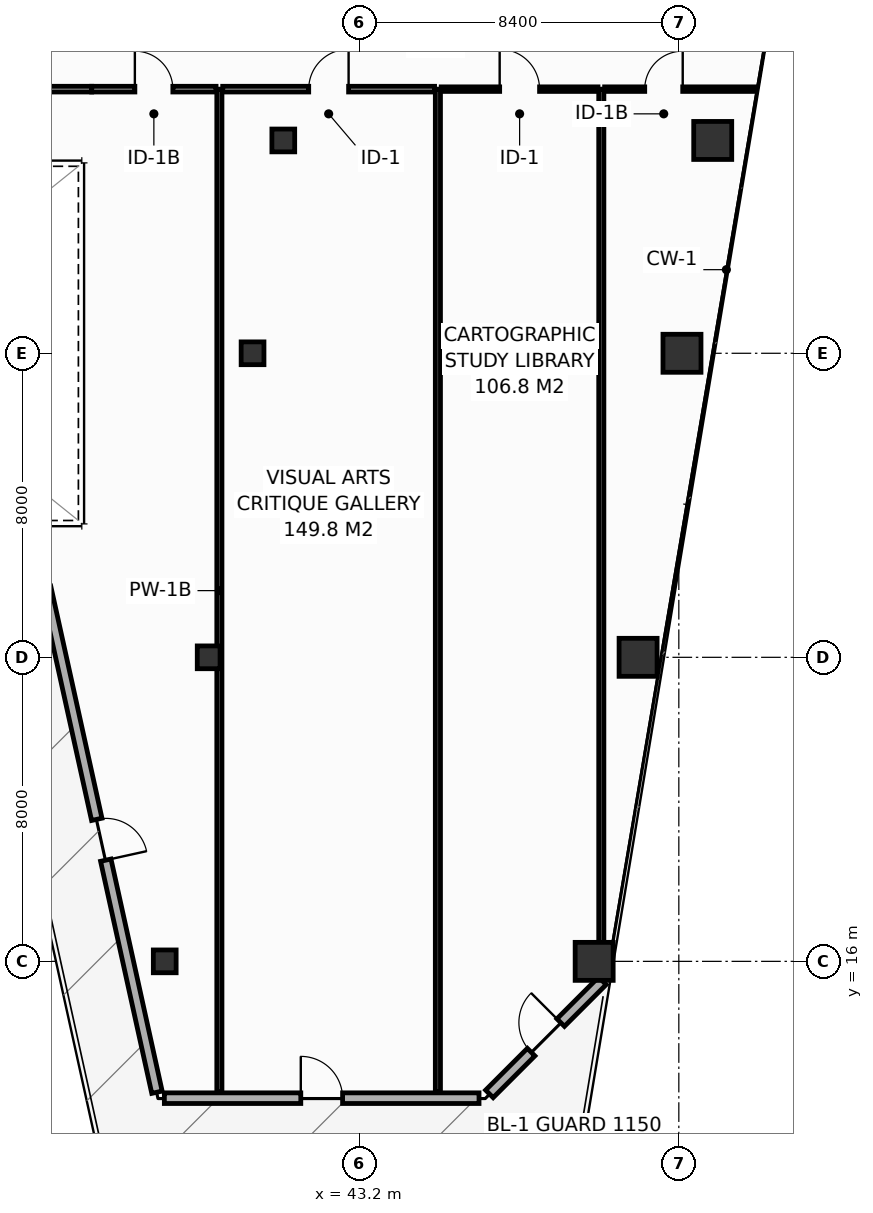
"""IFC4 building model, lengths in metres.
Left out: names, types, materials, properties, quantities, classifications, styles, units other than length and angle.
Written with IfcOpenShell. Run it as: python <this file> out.ifc"""

import sys

from ifc_helpers import new_model, si_unit, direction, frame, frame_2d, origin, origin_2d, place, context, subcontext, project, spatial, rectangle, hollow_rectangle, extrude, element, fill, save


model = new_model("IFC4")
c1 = context("Model", 3, precision=1e-05, world=origin(), true_north=direction((0.0, 1.0)))
c2 = subcontext(c1, "Body", "Model", "MODEL_VIEW")
j1 = project(units=[si_unit("LENGTHUNIT", "METRE"), si_unit("PLANEANGLEUNIT", "RADIAN")], contexts=[c1])
p1 = place(None, origin())
s1 = spatial("IfcSite", under=j1, at=p1, CompositionType="ELEMENT")
p2 = place(p1, origin())
s2 = spatial("IfcBuilding", under=s1, at=p2, CompositionType="ELEMENT")
p3 = place(p2, frame((0.0, 0.0, 167.6)))
s3 = spatial("IfcBuildingStorey", under=s2, at=p3, CompositionType="ELEMENT", Elevation=167.6)
p4 = place(p3, frame((49.372, 16.0, 0.0), z_axis=(0.0, 0.0, 1.0), x_axis=(1.0, 0.0, 0.0)))
e1 = element("IfcColumn", 1, at=p4, inside=s3, PredefinedType="COLUMN", context=c2, shape_type="SweptSolid", body=[
    extrude(hollow_rectangle(XDim=1.0, YDim=1.0, WallThickness=0.045, at=origin_2d()), origin(), (0.0, 0.0, 1.0), 3.8),
])
p5 = place(p3, frame((38.072, 16.0, 0.0), z_axis=(0.0, 0.0, 1.0), x_axis=(1.0, 0.0, 0.0)))
e2 = element("IfcColumn", 2, at=p5, inside=s3, PredefinedType="COLUMN", context=c2, shape_type="SweptSolid", body=[
    extrude(hollow_rectangle(XDim=0.6, YDim=0.6, WallThickness=0.028, at=origin_2d()), origin(), (0.0, 0.0, 1.0), 3.8),
])
p6 = place(p3, frame((50.528, 24.0, 0.0), z_axis=(0.0, 0.0, 1.0), x_axis=(1.0, 0.0, 0.0)))
e3 = element("IfcColumn", 3, at=p6, inside=s3, PredefinedType="COLUMN", context=c2, shape_type="SweptSolid", body=[
    extrude(hollow_rectangle(XDim=1.0, YDim=1.0, WallThickness=0.045, at=origin_2d()), origin(), (0.0, 0.0, 1.0), 3.8),
])
p7 = place(p3, frame((39.228, 24.0, 0.0), z_axis=(0.0, 0.0, 1.0), x_axis=(1.0, 0.0, 0.0)))
e4 = element("IfcColumn", 4, at=p7, inside=s3, PredefinedType="COLUMN", context=c2, shape_type="SweptSolid", body=[
    extrude(hollow_rectangle(XDim=0.6, YDim=0.6, WallThickness=0.028, at=origin_2d()), origin(), (0.0, 0.0, 1.0), 3.8),
])
p8 = place(p3, frame((51.683, 32.0, 0.0), z_axis=(0.0, 0.0, 1.0), x_axis=(1.0, 0.0, 0.0)))
e5 = element("IfcColumn", 5, at=p8, inside=s3, PredefinedType="COLUMN", context=c2, shape_type="SweptSolid", body=[
    extrude(hollow_rectangle(XDim=1.0, YDim=1.0, WallThickness=0.045, at=origin_2d()), origin(), (0.0, 0.0, 1.0), 3.8),
])
p9 = place(p3, frame((40.383, 32.0, 0.0), z_axis=(0.0, 0.0, 1.0), x_axis=(1.0, 0.0, 0.0)))
e6 = element("IfcColumn", 6, at=p9, inside=s3, PredefinedType="COLUMN", context=c2, shape_type="SweptSolid", body=[
    extrude(hollow_rectangle(XDim=0.6, YDim=0.6, WallThickness=0.028, at=origin_2d()), origin(), (0.0, 0.0, 1.0), 3.8),
])
p10 = place(p3, frame((52.492, 37.6, 0.0), z_axis=(0.0, 0.0, 1.0), x_axis=(1.0, 0.0, 0.0)))
e7 = element("IfcColumn", 7, at=p10, inside=s3, PredefinedType="COLUMN", context=c2, shape_type="SweptSolid", body=[
    extrude(hollow_rectangle(XDim=1.0, YDim=1.0, WallThickness=0.045, at=origin_2d()), origin(), (0.0, 0.0, 1.0), 3.8),
])
p11 = place(p3, frame((41.192, 37.6, 0.0), z_axis=(0.0, 0.0, 1.0), x_axis=(1.0, 0.0, 0.0)))
e8 = element("IfcColumn", 8, at=p11, inside=s3, PredefinedType="COLUMN", context=c2, shape_type="SweptSolid", body=[
    extrude(hollow_rectangle(XDim=0.6, YDim=0.6, WallThickness=0.028, at=origin_2d()), origin(), (0.0, 0.0, 1.0), 3.8),
])
p12 = place(p3, frame((34.937, 25.844, 0.0), z_axis=(0.0, 0.0, 1.0), x_axis=(0.215397075206, -0.976526548535, 0.0)))
e9 = element("IfcWall", 9, at=p12, inside=s3, PredefinedType="STANDARD", context=c2, shape_type="SweptSolid", body=[
    extrude(rectangle(XDim=13.607, YDim=0.28, at=frame_2d((6.803, 0.0))), origin(), (0.0, 0.0, 1.0), 3.55),
])
p13 = place(p12, frame((6.254, 0.0, 0.0)))
e10 = element("IfcOpeningElement", 10, at=p13, cuts=e9, PredefinedType="OPENING", context=c2, shape_type="SweptSolid", body=[
    extrude(rectangle(XDim=1.1, YDim=2.2, at=frame_2d((0.55, 1.1))), frame((0.0, 0.15, 0.0), z_axis=(0.0, -1.0, 0.0), x_axis=(1.0, 0.0, 0.0)), (0.0, 0.0, 1.0), 0.3),
])
p14 = place(p3, frame((38.062, 12.4, 0.0), z_axis=(0.0, 0.0, 1.0), x_axis=(1.0, 0.0, 0.0)))
e11 = element("IfcWall", 11, at=p14, inside=s3, PredefinedType="STANDARD", context=c2, shape_type="SweptSolid", body=[
    extrude(rectangle(XDim=8.28, YDim=0.28, at=frame_2d((4.14, 0.0))), origin(), (0.0, 0.0, 1.0), 3.55),
])
p15 = place(p14, frame((3.59, 0.0, 0.0)))
e12 = element("IfcOpeningElement", 12, at=p15, cuts=e11, PredefinedType="OPENING", context=c2, shape_type="SweptSolid", body=[
    extrude(rectangle(XDim=1.1, YDim=2.2, at=frame_2d((0.55, 1.1))), frame((0.0, 0.15, 0.0), z_axis=(0.0, -1.0, 0.0), x_axis=(1.0, 0.0, 0.0)), (0.0, 0.0, 1.0), 0.3),
])
p16 = place(p3, frame((46.615, 12.513, 0.0), z_axis=(0.0, 0.0, 1.0), x_axis=(0.707135806771, 0.70707775441, 0.0)))
e13 = element("IfcWall", 13, at=p16, inside=s3, PredefinedType="STANDARD", context=c2, shape_type="SweptSolid", body=[
    extrude(rectangle(XDim=4.206, YDim=0.28, at=frame_2d((2.103, 0.0))), origin(), (0.0, 0.0, 1.0), 3.55),
])
p17 = place(p16, frame((1.553, 0.0, 0.0)))
e14 = element("IfcOpeningElement", 14, at=p17, cuts=e13, PredefinedType="OPENING", context=c2, shape_type="SweptSolid", body=[
    extrude(rectangle(XDim=1.1, YDim=2.2, at=frame_2d((0.55, 1.1))), frame((0.0, 0.15, 0.0), z_axis=(0.0, -1.0, 0.0), x_axis=(1.0, 0.0, 0.0)), (0.0, 0.0, 1.0), 0.3),
])
for number, where, z_axis, x_axis in (
    (15, (39.51, 12.56, 0.0), (0.0, 0.0, 1.0), (0.0, 1.0, 0.0)),
    (16, (45.26, 12.56, 0.0), (0.0, 0.0, 1.0), (0.0, 1.0, 0.0)),
):
    element("IfcWall", number, at=place(p3, frame(where, z_axis=z_axis, x_axis=x_axis)), inside=s3, PredefinedType="PARTITIONING", context=c2, shape_type="SweptSolid", body=[
        extrude(rectangle(XDim=26.39, YDim=0.135, at=frame_2d((13.195, 0.0))), origin(), (0.0, 0.0, 1.0), 2.835),
    ])
p18 = place(p3, frame((49.56, 15.516, 0.0), z_axis=(0.0, 0.0, 1.0), x_axis=(0.0, 1.0, 0.0)))
e17 = element("IfcWall", 17, at=p18, inside=s3, PredefinedType="PARTITIONING", context=c2, shape_type="SweptSolid", body=[
    extrude(rectangle(XDim=23.434, YDim=0.135, at=frame_2d((11.717, 0.0))), origin(), (0.0, 0.0, 1.0), 2.835),
])
p19 = place(p3, frame((23.85, 38.95, 0.0), z_axis=(0.0, 0.0, 1.0), x_axis=(1.0, 0.0, 0.0)))
e18 = element("IfcWall", 18, at=p19, inside=s3, PredefinedType="PARTITIONING", context=c2, shape_type="SweptSolid", body=[
    extrude(rectangle(XDim=12.3, YDim=0.15, at=frame_2d((6.15, 0.0))), origin(), (0.0, 0.0, 1.0), 3.55),
])
p20 = place(p3, frame((36.15, 38.95, 0.0), z_axis=(0.0, 0.0, 1.0), x_axis=(1.0, 0.0, 0.0)))
e19 = element("IfcWall", 19, at=p20, inside=s3, PredefinedType="PARTITIONING", context=c2, shape_type="SweptSolid", body=[
    extrude(rectangle(XDim=3.273, YDim=0.15, at=frame_2d((1.636, 0.0))), origin(), (0.0, 0.0, 1.0), 3.55),
])
p21 = place(p20, frame((1.136, 0.0, 0.0)))
e20 = element("IfcOpeningElement", 20, at=p21, cuts=e19, PredefinedType="OPENING", context=c2, shape_type="SweptSolid", body=[
    extrude(rectangle(XDim=1.0, YDim=2.15, at=frame_2d((0.5, 1.075))), frame((0.0, 0.085, 0.0), z_axis=(0.0, -1.0, 0.0), x_axis=(1.0, 0.0, 0.0)), (0.0, 0.0, 1.0), 0.17),
])
p22 = place(p3, frame((39.597, 38.95, 0.0), z_axis=(0.0, 0.0, 1.0), x_axis=(1.0, 0.0, 0.0)))
e21 = element("IfcWall", 21, at=p22, inside=s3, PredefinedType="PARTITIONING", context=c2, shape_type="SweptSolid", body=[
    extrude(rectangle(XDim=5.575, YDim=0.15, at=frame_2d((2.788, 0.0))), origin(), (0.0, 0.0, 1.0), 2.835),
])
p23 = place(p22, frame((2.263, 0.0, 0.0)))
e22 = element("IfcOpeningElement", 22, at=p23, cuts=e21, PredefinedType="OPENING", context=c2, shape_type="SweptSolid", body=[
    extrude(rectangle(XDim=1.05, YDim=2.15, at=frame_2d((0.525, 1.075))), frame((0.0, 0.085, 0.0), z_axis=(0.0, -1.0, 0.0), x_axis=(1.0, 0.0, 0.0)), (0.0, 0.0, 1.0), 0.17),
])
p24 = place(p3, frame((45.347, 38.95, 0.0), z_axis=(0.0, 0.0, 1.0), x_axis=(1.0, 0.0, 0.0)))
e23 = element("IfcWall", 23, at=p24, inside=s3, PredefinedType="PARTITIONING", context=c2, shape_type="SweptSolid", body=[
    extrude(rectangle(XDim=4.125, YDim=0.12, at=frame_2d((2.062, 0.0))), origin(), (0.0, 0.0, 1.0), 3.55),
])
p25 = place(p24, frame((1.538, 0.0, 0.0)))
e24 = element("IfcOpeningElement", 24, at=p25, cuts=e23, PredefinedType="OPENING", context=c2, shape_type="SweptSolid", body=[
    extrude(rectangle(XDim=1.05, YDim=2.15, at=frame_2d((0.525, 1.075))), frame((0.0, 0.07, 0.0), z_axis=(0.0, -1.0, 0.0), x_axis=(1.0, 0.0, 0.0)), (0.0, 0.0, 1.0), 0.14),
])
p26 = place(p3, frame((49.647, 38.95, 0.0), z_axis=(0.0, 0.0, 1.0), x_axis=(1.0, 0.0, 0.0)))
e25 = element("IfcWall", 25, at=p26, inside=s3, PredefinedType="PARTITIONING", context=c2, shape_type="SweptSolid", body=[
    extrude(rectangle(XDim=3.99, YDim=0.12, at=frame_2d((1.995, 0.0))), origin(), (0.0, 0.0, 1.0), 3.035),
])
p27 = place(p26, frame((1.055, 0.0, 0.0)))
e26 = element("IfcOpeningElement", 26, at=p27, cuts=e25, PredefinedType="OPENING", context=c2, shape_type="SweptSolid", body=[
    extrude(rectangle(XDim=1.0, YDim=2.15, at=frame_2d((0.5, 1.075))), frame((0.0, 0.07, 0.0), z_axis=(0.0, -1.0, 0.0), x_axis=(1.0, 0.0, 0.0)), (0.0, 0.0, 1.0), 0.14),
])
p28 = place(p13, origin())
e27 = element("IfcDoor", 27, at=p28, inside=s3, OperationType="SINGLE_SWING_RIGHT", PredefinedType="DOOR", context=c2, shape_type="SweptSolid", body=[
    extrude(rectangle(XDim=1.1, YDim=2.2, at=frame_2d((0.55, 1.1))), frame((0.0, 0.025, 0.0), z_axis=(0.0, -1.0, 0.0), x_axis=(1.0, 0.0, 0.0)), (0.0, 0.0, 1.0), 0.05),
])
fill(e10, e27)
p29 = place(p15, origin())
e28 = element("IfcDoor", 28, at=p29, inside=s3, OperationType="SINGLE_SWING_LEFT", PredefinedType="DOOR", context=c2, shape_type="SweptSolid", body=[
    extrude(rectangle(XDim=1.1, YDim=2.2, at=frame_2d((0.55, 1.1))), frame((0.0, 0.025, 0.0), z_axis=(0.0, -1.0, 0.0), x_axis=(1.0, 0.0, 0.0)), (0.0, 0.0, 1.0), 0.05),
])
fill(e12, e28)
p30 = place(p17, origin())
e29 = element("IfcDoor", 29, at=p30, inside=s3, OperationType="SINGLE_SWING_RIGHT", PredefinedType="DOOR", context=c2, shape_type="SweptSolid", body=[
    extrude(rectangle(XDim=1.1, YDim=2.2, at=frame_2d((0.55, 1.1))), frame((0.0, 0.025, 0.0), z_axis=(0.0, -1.0, 0.0), x_axis=(1.0, 0.0, 0.0)), (0.0, 0.0, 1.0), 0.05),
])
fill(e14, e29)
p31 = place(p21, origin())
e30 = element("IfcDoor", 30, at=p31, inside=s3, OperationType="SINGLE_SWING_LEFT", PredefinedType="DOOR", context=c2, shape_type="SweptSolid", body=[
    extrude(rectangle(XDim=1.0, YDim=2.15, at=frame_2d((0.5, 1.075))), frame((0.0, 0.025, 0.0), z_axis=(0.0, -1.0, 0.0), x_axis=(1.0, 0.0, 0.0)), (0.0, 0.0, 1.0), 0.05),
])
fill(e20, e30)
p32 = place(p23, origin())
e31 = element("IfcDoor", 31, at=p32, inside=s3, OperationType="SINGLE_SWING_RIGHT", PredefinedType="DOOR", context=c2, shape_type="SweptSolid", body=[
    extrude(rectangle(XDim=1.05, YDim=2.15, at=frame_2d((0.525, 1.075))), frame((0.0, 0.025, 0.0), z_axis=(0.0, -1.0, 0.0), x_axis=(1.0, 0.0, 0.0)), (0.0, 0.0, 1.0), 0.05),
])
fill(e22, e31)
p33 = place(p25, origin())
e32 = element("IfcDoor", 32, at=p33, inside=s3, OperationType="SINGLE_SWING_LEFT", PredefinedType="DOOR", context=c2, shape_type="SweptSolid", body=[
    extrude(rectangle(XDim=1.05, YDim=2.15, at=frame_2d((0.525, 1.075))), frame((0.0, 0.025, 0.0), z_axis=(0.0, -1.0, 0.0), x_axis=(1.0, 0.0, 0.0)), (0.0, 0.0, 1.0), 0.05),
])
fill(e24, e32)
p34 = place(p27, origin())
e33 = element("IfcDoor", 33, at=p34, inside=s3, OperationType="SINGLE_SWING_RIGHT", PredefinedType="DOOR", context=c2, shape_type="SweptSolid", body=[
    extrude(rectangle(XDim=1.0, YDim=2.15, at=frame_2d((0.5, 1.075))), frame((0.0, 0.025, 0.0), z_axis=(0.0, -1.0, 0.0), x_axis=(1.0, 0.0, 0.0)), (0.0, 0.0, 1.0), 0.05),
])
fill(e26, e33)
save(model, sys.argv[1])
